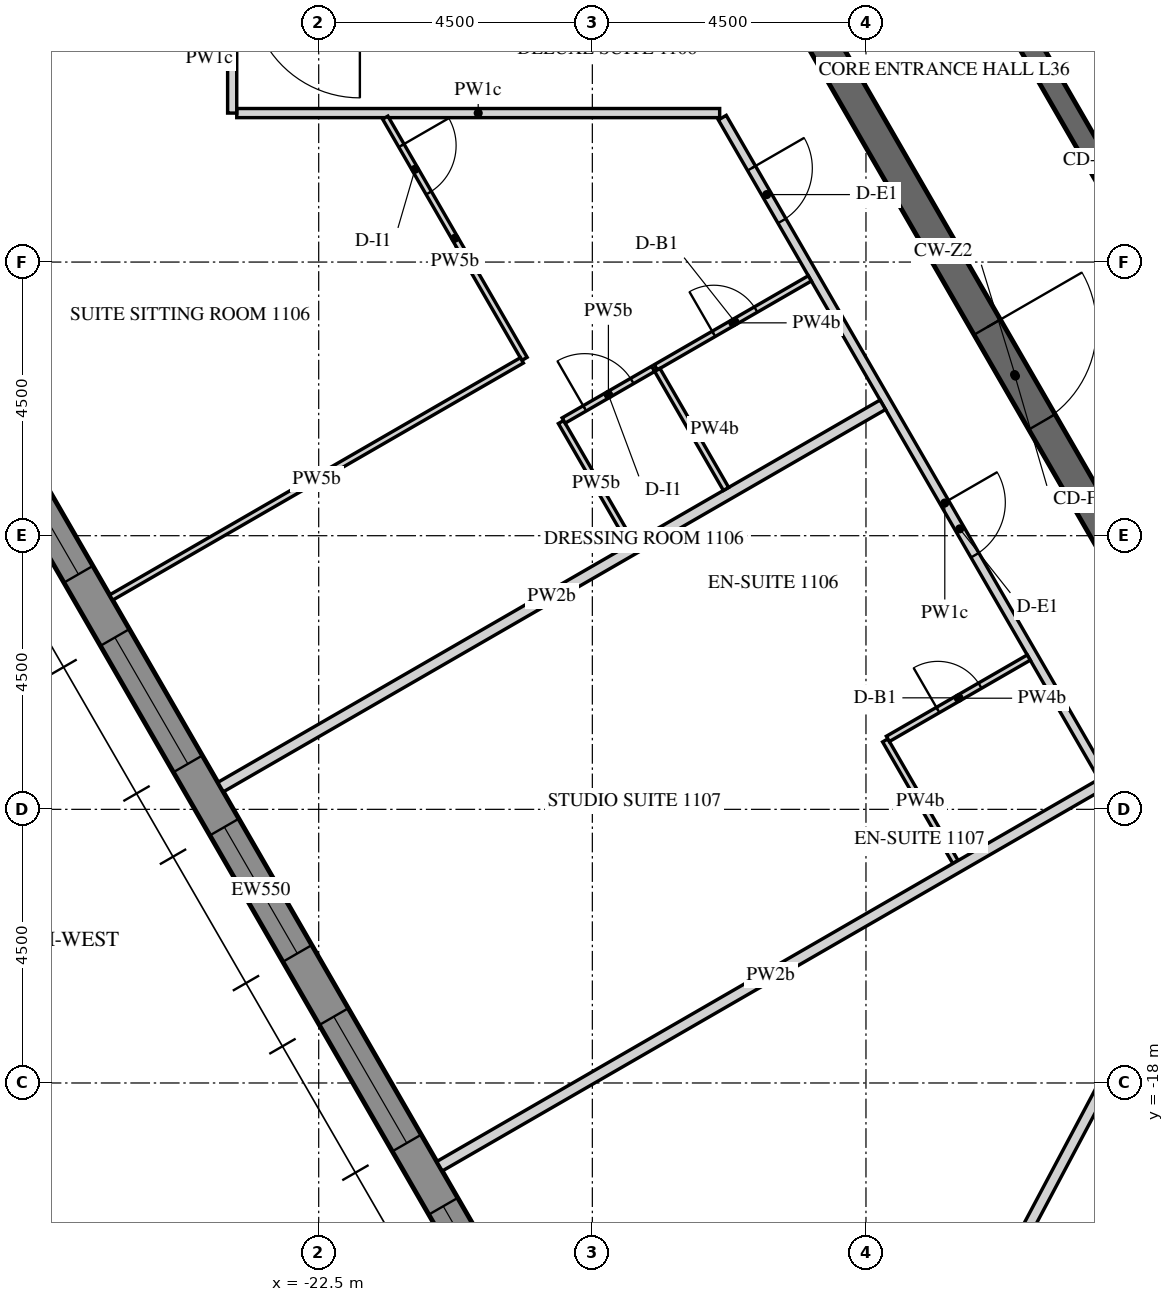
"""IFC4 building model, lengths in metres.
Left out: names, types, materials, properties, quantities, classifications, styles, units other than length and angle.
Written with IfcOpenShell. Run it as: python <this file> out.ifc"""

import sys

from ifc_helpers import new_model, si_unit, direction, frame, frame_2d, origin, place, context, subcontext, project, spatial, polyline, rectangle, outline, extrude, element, fill, save


model = new_model("IFC4")
c1 = context("Model", 3, precision=1e-05, world=origin(), true_north=direction((0.0, 1.0)))
c2 = subcontext(c1, "Body", "Model", "MODEL_VIEW")
j1 = project(units=[si_unit("LENGTHUNIT", "METRE"), si_unit("PLANEANGLEUNIT", "RADIAN")], contexts=[c1])
p1 = place(None, origin())
s1 = spatial("IfcSite", under=j1, at=p1, CompositionType="ELEMENT")
p2 = place(p1, origin())
s2 = spatial("IfcBuilding", under=s1, at=p2, CompositionType="ELEMENT")
p3 = place(p2, frame((0.0, 0.0, 156.6)))
s3 = spatial("IfcBuildingStorey", under=s2, at=p3, CompositionType="ELEMENT", Elevation=156.6)
p4 = place(p3, frame((-30.391, -2.811, -0.15), z_axis=(0.0, 0.0, 1.0), x_axis=(0.499998569178, -0.866026229868, 0.0)))
e1 = element("IfcWall", 1, at=p4, inside=s3, PredefinedType="SOLIDWALL", context=c2, shape_type="SweptSolid", body=[
    extrude(outline(polyline([(-0.022, -0.275), (27.783, -0.275), (27.732, 0.275), (0.022, 0.275), (-0.022, -0.275)])), origin(), (0.0, 0.0, 1.0), 3.9),
])
p5 = place(p4, frame((1.879, 0.0, 1.05)))
e2 = element("IfcOpeningElement", 2, at=p5, cuts=e1, PredefinedType="OPENING", context=c2, shape_type="SweptSolid", body=[
    extrude(rectangle(XDim=2.4, YDim=2.4, at=frame_2d((1.2, 1.2))), frame((0.0, 0.285, 0.0), z_axis=(0.0, -1.0, 0.0), x_axis=(1.0, 0.0, 0.0)), (0.0, 0.0, 1.0), 0.57),
])
p6 = place(p4, frame((5.479, 0.0, 1.05)))
e3 = element("IfcOpeningElement", 3, at=p6, cuts=e1, PredefinedType="OPENING", context=c2, shape_type="SweptSolid", body=[
    extrude(rectangle(XDim=2.4, YDim=2.4, at=frame_2d((1.2, 1.2))), frame((0.0, 0.285, 0.0), z_axis=(0.0, -1.0, 0.0), x_axis=(1.0, 0.0, 0.0)), (0.0, 0.0, 1.0), 0.57),
])
p7 = place(p4, frame((9.079, 0.0, 1.05)))
e4 = element("IfcOpeningElement", 4, at=p7, cuts=e1, PredefinedType="OPENING", context=c2, shape_type="SweptSolid", body=[
    extrude(rectangle(XDim=2.4, YDim=2.4, at=frame_2d((1.2, 1.2))), frame((0.0, 0.285, 0.0), z_axis=(0.0, -1.0, 0.0), x_axis=(1.0, 0.0, 0.0)), (0.0, 0.0, 1.0), 0.57),
])
p8 = place(p4, frame((12.679, 0.0, 1.05)))
e5 = element("IfcOpeningElement", 5, at=p8, cuts=e1, PredefinedType="OPENING", context=c2, shape_type="SweptSolid", body=[
    extrude(rectangle(XDim=2.4, YDim=2.4, at=frame_2d((1.2, 1.2))), frame((0.0, 0.285, 0.0), z_axis=(0.0, -1.0, 0.0), x_axis=(1.0, 0.0, 0.0)), (0.0, 0.0, 1.0), 0.57),
])
p9 = place(p4, frame((16.279, 0.0, 1.05)))
e6 = element("IfcOpeningElement", 6, at=p9, cuts=e1, PredefinedType="OPENING", context=c2, shape_type="SweptSolid", body=[
    extrude(rectangle(XDim=2.4, YDim=2.4, at=frame_2d((1.2, 1.2))), frame((0.0, 0.285, 0.0), z_axis=(0.0, -1.0, 0.0), x_axis=(1.0, 0.0, 0.0)), (0.0, 0.0, 1.0), 0.57),
])
p10 = place(p4, frame((19.879, 0.0, 1.05)))
e7 = element("IfcOpeningElement", 7, at=p10, cuts=e1, PredefinedType="OPENING", context=c2, shape_type="SweptSolid", body=[
    extrude(rectangle(XDim=2.4, YDim=2.4, at=frame_2d((1.2, 1.2))), frame((0.0, 0.285, 0.0), z_axis=(0.0, -1.0, 0.0), x_axis=(1.0, 0.0, 0.0)), (0.0, 0.0, 1.0), 0.57),
])
p11 = place(p4, frame((23.479, 0.0, 1.05)))
e8 = element("IfcOpeningElement", 8, at=p11, cuts=e1, PredefinedType="OPENING", context=c2, shape_type="SweptSolid", body=[
    extrude(rectangle(XDim=2.4, YDim=2.4, at=frame_2d((1.2, 1.2))), frame((0.0, 0.285, 0.0), z_axis=(0.0, -1.0, 0.0), x_axis=(1.0, 0.0, 0.0)), (0.0, 0.0, 1.0), 0.57),
])
p12 = place(p3, frame((-14.722, 0.0, -0.15), z_axis=(0.0, 0.0, 1.0), x_axis=(0.50000571537, -0.866022103989, 0.0)))
e9 = element("IfcWall", 9, at=p12, inside=s3, PredefinedType="SHEAR", context=c2, shape_type="SweptSolid", body=[
    extrude(outline(polyline([(-0.144, -0.25), (14.867, -0.25), (14.578, 0.25), (0.144, 0.25), (-0.144, -0.25)])), origin(), (0.0, 0.0, 1.0), 3.9),
])
p13 = place(p12, frame((6.432, 0.0, 0.15)))
e10 = element("IfcOpeningElement", 10, at=p13, cuts=e9, PredefinedType="OPENING", context=c2, shape_type="SweptSolid", body=[
    extrude(rectangle(XDim=1.8, YDim=2.4, at=frame_2d((0.9, 1.2))), frame((0.0, 0.26, 0.0), z_axis=(0.0, -1.0, 0.0), x_axis=(1.0, 0.0, 0.0)), (0.0, 0.0, 1.0), 0.52),
])
p14 = place(p3, frame((-11.345, 0.0, -0.15), z_axis=(0.0, 0.0, 1.0), x_axis=(0.499995046907, -0.866028263435, 0.0)))
e11 = element("IfcWall", 11, at=p14, inside=s3, PredefinedType="SHEAR", context=c2, shape_type="SweptSolid", body=[
    extrude(outline(polyline([(-0.101, -0.175), (11.446, -0.175), (11.244, 0.175), (0.101, 0.175), (-0.101, -0.175)])), origin(), (0.0, 0.0, 1.0), 3.9),
])
p15 = place(p14, frame((4.744, 0.0, 0.15)))
e12 = element("IfcOpeningElement", 12, at=p15, cuts=e11, PredefinedType="OPENING", context=c2, shape_type="SweptSolid", body=[
    extrude(rectangle(XDim=1.8, YDim=2.4, at=frame_2d((0.9, 1.2))), frame((0.0, 0.185, 0.0), z_axis=(0.0, -1.0, 0.0), x_axis=(1.0, 0.0, 0.0)), (0.0, 0.0, 1.0), 0.37),
])
p16 = place(p3, frame((-23.848, -2.05, 0.0), z_axis=(0.0, 0.0, 1.0), x_axis=(1.0, 0.0, 0.0)))
e13 = element("IfcWall", 13, at=p16, inside=s3, PredefinedType="PARTITIONING", context=c2, shape_type="SweptSolid", body=[
    extrude(rectangle(XDim=7.942, YDim=0.15, at=frame_2d((3.971, 0.0))), origin(), (0.0, 0.0, 1.0), 2.823),
])
p17 = place(p3, frame((-15.863, -2.125, 0.0), z_axis=(0.0, 0.0, 1.0), x_axis=(0.500008833422, -0.866020303746, 0.0)))
e14 = element("IfcWall", 14, at=p17, inside=s3, PredefinedType="PARTITIONING", context=c2, shape_type="SweptSolid", body=[
    extrude(rectangle(XDim=14.636, YDim=0.15, at=frame_2d((7.318, 0.0))), origin(), (0.0, 0.0, 1.0), 2.823),
])
p18 = place(p17, frame((0.961, 0.0, 0.0)))
e15 = element("IfcOpeningElement", 15, at=p18, cuts=e14, PredefinedType="OPENING", context=c2, shape_type="SweptSolid", body=[
    extrude(rectangle(XDim=1.0, YDim=2.1, at=frame_2d((0.5, 1.05))), frame((0.0, 0.085, 0.0), z_axis=(0.0, -1.0, 0.0), x_axis=(1.0, 0.0, 0.0)), (0.0, 0.0, 1.0), 0.17),
])
p19 = place(p17, frame((7.309, 0.0, 0.0)))
e16 = element("IfcOpeningElement", 16, at=p19, cuts=e14, PredefinedType="OPENING", context=c2, shape_type="SweptSolid", body=[
    extrude(rectangle(XDim=1.0, YDim=2.1, at=frame_2d((0.5, 1.05))), frame((0.0, 0.085, 0.0), z_axis=(0.0, -1.0, 0.0), x_axis=(1.0, 0.0, 0.0)), (0.0, 0.0, 1.0), 0.17),
])
p20 = place(p17, frame((13.486, 0.0, 0.0)))
e17 = element("IfcOpeningElement", 17, at=p20, cuts=e14, PredefinedType="OPENING", context=c2, shape_type="SweptSolid", body=[
    extrude(rectangle(XDim=1.0, YDim=2.1, at=frame_2d((0.5, 1.05))), frame((0.0, 0.085, 0.0), z_axis=(0.0, -1.0, 0.0), x_axis=(1.0, 0.0, 0.0)), (0.0, 0.0, 1.0), 0.17),
])
p21 = place(p3, frame((-23.923, -0.25, 0.0), z_axis=(0.0, 0.0, 1.0), x_axis=(0.0, -1.0, 0.0)))
e18 = element("IfcWall", 18, at=p21, inside=s3, PredefinedType="PARTITIONING", context=c2, shape_type="SweptSolid", body=[
    extrude(rectangle(XDim=1.8, YDim=0.15, at=frame_2d((0.9, 0.0))), origin(), (0.0, 0.0, 1.0), 2.823),
])
p22 = place(p3, frame((-16.956, -6.231, 0.0), z_axis=(0.0, 0.0, 1.0), x_axis=(0.866046596414, 0.499963291492, 0.0)))
e19 = element("IfcWall", 19, at=p22, inside=s3, PredefinedType="PARTITIONING", context=c2, shape_type="SweptSolid", body=[
    extrude(rectangle(XDim=2.925, YDim=0.1, at=frame_2d((1.462, 0.0))), origin(), (0.0, 0.0, 1.0), 2.823),
])
p23 = place(p22, frame((1.1, 0.0, 0.0)))
e20 = element("IfcOpeningElement", 20, at=p23, cuts=e19, PredefinedType="OPENING", context=c2, shape_type="SweptSolid", body=[
    extrude(rectangle(XDim=0.8, YDim=2.1, at=frame_2d((0.4, 1.05))), frame((0.0, 0.06, 0.0), z_axis=(0.0, -1.0, 0.0), x_axis=(1.0, 0.0, 0.0)), (0.0, 0.0, 1.0), 0.12),
])
p24 = place(p3, frame((-17.36, -9.131, 0.0), z_axis=(0.0, 0.0, 1.0), x_axis=(-0.500015210774, 0.866016621662, 0.0)))
e21 = element("IfcWall", 21, at=p24, inside=s3, PredefinedType="PARTITIONING", context=c2, shape_type="SweptSolid", body=[
    extrude(rectangle(XDim=2.31, YDim=0.1, at=frame_2d((1.155, 0.0))), origin(), (0.0, 0.0, 1.0), 2.823),
])
p25 = place(p3, frame((-18.472, -7.106, 0.0), z_axis=(0.0, 0.0, 1.0), x_axis=(0.866087547558, 0.499892348375, 0.0)))
e22 = element("IfcWall", 22, at=p25, inside=s3, PredefinedType="PARTITIONING", context=c2, shape_type="SweptSolid", body=[
    extrude(rectangle(XDim=1.7, YDim=0.1, at=frame_2d((0.85, 0.0))), origin(), (0.0, 0.0, 1.0), 2.823),
])
p26 = place(p25, frame((0.4, 0.0, 0.0)))
e23 = element("IfcOpeningElement", 23, at=p26, cuts=e22, PredefinedType="OPENING", context=c2, shape_type="SweptSolid", body=[
    extrude(rectangle(XDim=0.9, YDim=2.1, at=frame_2d((0.45, 1.05))), frame((0.0, 0.06, 0.0), z_axis=(0.0, -1.0, 0.0), x_axis=(1.0, 0.0, 0.0)), (0.0, 0.0, 1.0), 0.12),
])
p27 = place(p3, frame((-21.405, -2.125, 0.0), z_axis=(0.0, 0.0, 1.0), x_axis=(0.49999161165, -0.866030246746, 0.0)))
e24 = element("IfcWall", 24, at=p27, inside=s3, PredefinedType="PARTITIONING", context=c2, shape_type="SweptSolid", body=[
    extrude(rectangle(XDim=4.58, YDim=0.1, at=frame_2d((2.29, 0.0))), origin(), (0.0, 0.0, 1.0), 2.823),
])
p28 = place(p27, frame((0.53, 0.0, 0.0)))
e25 = element("IfcOpeningElement", 25, at=p28, cuts=e24, PredefinedType="OPENING", context=c2, shape_type="SweptSolid", body=[
    extrude(rectangle(XDim=0.9, YDim=2.1, at=frame_2d((0.45, 1.05))), frame((0.0, 0.06, 0.0), z_axis=(0.0, -1.0, 0.0), x_axis=(1.0, 0.0, 0.0)), (0.0, 0.0, 1.0), 0.12),
])
p29 = place(p3, frame((-19.158, -6.116, 0.0), z_axis=(0.0, 0.0, 1.0), x_axis=(-0.866021400173, -0.500006934395, 0.0)))
e26 = element("IfcWall", 26, at=p29, inside=s3, PredefinedType="PARTITIONING", context=c2, shape_type="SweptSolid", body=[
    extrude(rectangle(XDim=7.8, YDim=0.1, at=frame_2d((3.9, 0.0))), origin(), (0.0, 0.0, 1.0), 2.823),
])
p30 = place(p3, frame((-24.114, -13.134, 0.0), z_axis=(0.0, 0.0, 1.0), x_axis=(0.866024255907, 0.500001988177, 0.0)))
e27 = element("IfcWall", 27, at=p30, inside=s3, PredefinedType="PARTITIONING", context=c2, shape_type="SweptSolid", body=[
    extrude(rectangle(XDim=12.575, YDim=0.18, at=frame_2d((6.288, 0.0))), origin(), (0.0, 0.0, 1.0), 2.823),
])
p31 = place(p3, frame((-16.931, -6.274, 0.0), z_axis=(0.0, 0.0, 1.0), x_axis=(0.500077800282, -0.865980481111, 0.0)))
e28 = element("IfcWall", 28, at=p31, inside=s3, PredefinedType="PARTITIONING", context=c2, shape_type="SweptSolid", body=[
    extrude(rectangle(XDim=2.26, YDim=0.1, at=frame_2d((1.13, 0.0))), origin(), (0.0, 0.0, 1.0), 2.823),
])
p32 = place(p3, frame((-12.028, -14.367, 0.0), z_axis=(0.0, 0.0, 1.0), x_axis=(-0.500015210774, 0.866016621662, 0.0)))
e29 = element("IfcWall", 29, at=p32, inside=s3, PredefinedType="PARTITIONING", context=c2, shape_type="SweptSolid", body=[
    extrude(rectangle(XDim=2.31, YDim=0.1, at=frame_2d((1.155, 0.0))), origin(), (0.0, 0.0, 1.0), 2.823),
])
p33 = place(p3, frame((-13.14, -12.341, 0.0), z_axis=(0.0, 0.0, 1.0), x_axis=(0.86604424267, 0.499967368674, 0.0)))
e30 = element("IfcWall", 30, at=p33, inside=s3, PredefinedType="PARTITIONING", context=c2, shape_type="SweptSolid", body=[
    extrude(rectangle(XDim=2.675, YDim=0.1, at=frame_2d((1.337, 0.0))), origin(), (0.0, 0.0, 1.0), 2.823),
])
p34 = place(p33, frame((0.95, 0.0, 0.0)))
e31 = element("IfcOpeningElement", 31, at=p34, cuts=e30, PredefinedType="OPENING", context=c2, shape_type="SweptSolid", body=[
    extrude(rectangle(XDim=0.8, YDim=2.1, at=frame_2d((0.4, 1.05))), frame((0.0, 0.06, 0.0), z_axis=(0.0, -1.0, 0.0), x_axis=(1.0, 0.0, 0.0)), (0.0, 0.0, 1.0), 0.12),
])
p35 = place(p3, frame((-20.513, -19.37, 0.0), z_axis=(0.0, 0.0, 1.0), x_axis=(0.866019402111, 0.500010395058, 0.0)))
e32 = element("IfcWall", 32, at=p35, inside=s3, PredefinedType="PARTITIONING", context=c2, shape_type="SweptSolid", body=[
    extrude(rectangle(XDim=12.575, YDim=0.18, at=frame_2d((6.288, 0.0))), origin(), (0.0, 0.0, 1.0), 2.823),
])
p36 = place(p3, frame((-14.876, -27.977, 0.0), z_axis=(0.0, 0.0, 1.0), x_axis=(0.469475175214, 0.882945672088, 0.0)))
e33 = element("IfcWall", 33, at=p36, inside=s3, PredefinedType="PARTITIONING", context=c2, shape_type="SweptSolid", body=[
    extrude(rectangle(XDim=14.839, YDim=0.18, at=frame_2d((7.419, 0.0))), origin(), (0.0, 0.0, 1.0), 2.823),
])
p37 = place(p6, frame((0.0, 0.205, 0.0)))
e34 = element("IfcWindow", 34, at=p37, inside=s3, PartitioningType="DOUBLE_PANEL_VERTICAL", PredefinedType="WINDOW", context=c2, shape_type="SweptSolid", body=[
    extrude(rectangle(XDim=2.4, YDim=2.4, at=frame_2d((1.2, 1.2))), frame((0.0, 0.03, 0.0), z_axis=(0.0, -1.0, 0.0), x_axis=(1.0, 0.0, 0.0)), (0.0, 0.0, 1.0), 0.06),
])
fill(e3, e34)
p38 = place(p7, frame((0.0, 0.205, 0.0)))
e35 = element("IfcWindow", 35, at=p38, inside=s3, PartitioningType="DOUBLE_PANEL_VERTICAL", PredefinedType="WINDOW", context=c2, shape_type="SweptSolid", body=[
    extrude(rectangle(XDim=2.4, YDim=2.4, at=frame_2d((1.2, 1.2))), frame((0.0, 0.03, 0.0), z_axis=(0.0, -1.0, 0.0), x_axis=(1.0, 0.0, 0.0)), (0.0, 0.0, 1.0), 0.06),
])
fill(e4, e35)
p39 = place(p8, frame((0.0, 0.205, 0.0)))
e36 = element("IfcWindow", 36, at=p39, inside=s3, PartitioningType="DOUBLE_PANEL_VERTICAL", PredefinedType="WINDOW", context=c2, shape_type="SweptSolid", body=[
    extrude(rectangle(XDim=2.4, YDim=2.4, at=frame_2d((1.2, 1.2))), frame((0.0, 0.03, 0.0), z_axis=(0.0, -1.0, 0.0), x_axis=(1.0, 0.0, 0.0)), (0.0, 0.0, 1.0), 0.06),
])
fill(e5, e36)
p40 = place(p9, frame((0.0, 0.205, 0.0)))
e37 = element("IfcWindow", 37, at=p40, inside=s3, PartitioningType="DOUBLE_PANEL_VERTICAL", PredefinedType="WINDOW", context=c2, shape_type="SweptSolid", body=[
    extrude(rectangle(XDim=2.4, YDim=2.4, at=frame_2d((1.2, 1.2))), frame((0.0, 0.03, 0.0), z_axis=(0.0, -1.0, 0.0), x_axis=(1.0, 0.0, 0.0)), (0.0, 0.0, 1.0), 0.06),
])
fill(e6, e37)
p41 = place(p10, frame((0.0, 0.205, 0.0)))
e38 = element("IfcWindow", 38, at=p41, inside=s3, PartitioningType="DOUBLE_PANEL_VERTICAL", PredefinedType="WINDOW", context=c2, shape_type="SweptSolid", body=[
    extrude(rectangle(XDim=2.4, YDim=2.4, at=frame_2d((1.2, 1.2))), frame((0.0, 0.03, 0.0), z_axis=(0.0, -1.0, 0.0), x_axis=(1.0, 0.0, 0.0)), (0.0, 0.0, 1.0), 0.06),
])
fill(e7, e38)
p42 = place(p13, origin())
e39 = element("IfcDoor", 39, at=p42, inside=s3, OperationType="DOUBLE_DOOR_SINGLE_SWING", PredefinedType="DOOR", context=c2, shape_type="SweptSolid", body=[
    extrude(rectangle(XDim=1.8, YDim=2.4, at=frame_2d((0.9, 1.2))), frame((0.0, 0.025, 0.0), z_axis=(0.0, -1.0, 0.0), x_axis=(1.0, 0.0, 0.0)), (0.0, 0.0, 1.0), 0.05),
])
fill(e10, e39)
p43 = place(p18, origin())
e40 = element("IfcDoor", 40, at=p43, inside=s3, OperationType="SINGLE_SWING_RIGHT", PredefinedType="DOOR", context=c2, shape_type="SweptSolid", body=[
    extrude(rectangle(XDim=1.0, YDim=2.1, at=frame_2d((0.5, 1.05))), frame((0.0, 0.025, 0.0), z_axis=(0.0, -1.0, 0.0), x_axis=(1.0, 0.0, 0.0)), (0.0, 0.0, 1.0), 0.05),
])
fill(e15, e40)
p44 = place(p23, origin())
e41 = element("IfcDoor", 41, at=p44, inside=s3, OperationType="SINGLE_SWING_LEFT", PredefinedType="DOOR", context=c2, shape_type="SweptSolid", body=[
    extrude(rectangle(XDim=0.8, YDim=2.1, at=frame_2d((0.4, 1.05))), frame((0.0, 0.025, 0.0), z_axis=(0.0, -1.0, 0.0), x_axis=(1.0, 0.0, 0.0)), (0.0, 0.0, 1.0), 0.05),
])
fill(e20, e41)
p45 = place(p26, origin())
e42 = element("IfcDoor", 42, at=p45, inside=s3, OperationType="SINGLE_SWING_RIGHT", PredefinedType="DOOR", context=c2, shape_type="SweptSolid", body=[
    extrude(rectangle(XDim=0.9, YDim=2.1, at=frame_2d((0.45, 1.05))), frame((0.0, 0.025, 0.0), z_axis=(0.0, -1.0, 0.0), x_axis=(1.0, 0.0, 0.0)), (0.0, 0.0, 1.0), 0.05),
])
fill(e23, e42)
p46 = place(p28, origin())
e43 = element("IfcDoor", 43, at=p46, inside=s3, OperationType="SINGLE_SWING_RIGHT", PredefinedType="DOOR", context=c2, shape_type="SweptSolid", body=[
    extrude(rectangle(XDim=0.9, YDim=2.1, at=frame_2d((0.45, 1.05))), frame((0.0, 0.025, 0.0), z_axis=(0.0, -1.0, 0.0), x_axis=(1.0, 0.0, 0.0)), (0.0, 0.0, 1.0), 0.05),
])
fill(e25, e43)
p47 = place(p19, origin())
e44 = element("IfcDoor", 44, at=p47, inside=s3, OperationType="SINGLE_SWING_LEFT", PredefinedType="DOOR", context=c2, shape_type="SweptSolid", body=[
    extrude(rectangle(XDim=1.0, YDim=2.1, at=frame_2d((0.5, 1.05))), frame((0.0, 0.025, 0.0), z_axis=(0.0, -1.0, 0.0), x_axis=(1.0, 0.0, 0.0)), (0.0, 0.0, 1.0), 0.05),
])
fill(e16, e44)
p48 = place(p34, origin())
e45 = element("IfcDoor", 45, at=p48, inside=s3, OperationType="SINGLE_SWING_RIGHT", PredefinedType="DOOR", context=c2, shape_type="SweptSolid", body=[
    extrude(rectangle(XDim=0.8, YDim=2.1, at=frame_2d((0.4, 1.05))), frame((0.0, 0.025, 0.0), z_axis=(0.0, -1.0, 0.0), x_axis=(1.0, 0.0, 0.0)), (0.0, 0.0, 1.0), 0.05),
])
fill(e31, e45)
save(model, sys.argv[1])
